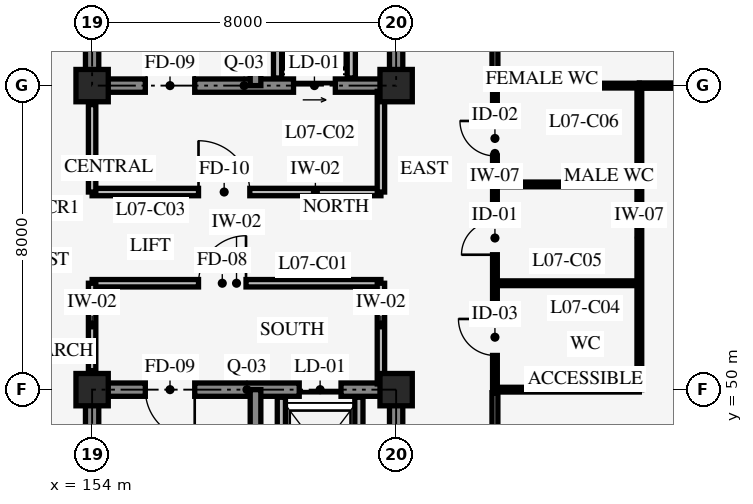
"""IFC4 building model, lengths in metres.
Left out: names, types, materials, properties, quantities, classifications, styles, units other than length and angle.
Written with IfcOpenShell. Run it as: python <this file> out.ifc"""

import sys

from ifc_helpers import new_model, si_unit, direction, frame, frame_2d, origin, origin_2d, place, context, subcontext, project, spatial, rectangle, extrude, element, fill, save


model = new_model("IFC4")
c1 = context("Model", 3, precision=1e-05, world=origin(), true_north=direction((0.0, 1.0)))
c2 = subcontext(c1, "Body", "Model", "MODEL_VIEW")
j1 = project(units=[si_unit("LENGTHUNIT", "METRE"), si_unit("PLANEANGLEUNIT", "RADIAN")], contexts=[c1])
p1 = place(None, origin())
s1 = spatial("IfcSite", under=j1, at=p1, CompositionType="ELEMENT")
p2 = place(p1, origin())
s2 = spatial("IfcBuilding", under=s1, at=p2, CompositionType="ELEMENT")
p3 = place(p2, frame((0.0, 0.0, 27.6)))
s3 = spatial("IfcBuildingStorey", under=s2, at=p3, CompositionType="ELEMENT", Elevation=27.6)
p4 = place(p3, frame((162.0, 42.0, 0.0), z_axis=(0.0, 0.0, 1.0), x_axis=(0.0, 1.0, 0.0)))
e1 = element("IfcWall", 1, at=p4, inside=s3, PredefinedType="SHEAR", context=c2, shape_type="SweptSolid", body=[
    extrude(rectangle(XDim=8.0, YDim=0.35, at=frame_2d((4.0, 0.0))), origin(), (0.0, 0.0, 1.0), 3.95),
])
p5 = place(p4, frame((3.175, 0.0, 0.0)))
e2 = element("IfcOpeningElement", 2, at=p5, cuts=e1, PredefinedType="OPENING", context=c2, shape_type="SweptSolid", body=[
    extrude(rectangle(XDim=1.05, YDim=2.2, at=frame_2d((0.525, 1.1))), frame((0.0, 0.185, 0.0), z_axis=(0.0, -1.0, 0.0), x_axis=(1.0, 0.0, 0.0)), (0.0, 0.0, 1.0), 0.37),
])
p6 = place(p3, frame((162.0, 50.0, 0.0), z_axis=(0.0, 0.0, 1.0), x_axis=(-1.0, 0.0, 0.0)))
e3 = element("IfcWall", 3, at=p6, inside=s3, PredefinedType="SHEAR", context=c2, shape_type="SweptSolid", body=[
    extrude(rectangle(XDim=8.0, YDim=0.35, at=frame_2d((4.0, 0.0))), origin(), (0.0, 0.0, 1.0), 3.95),
])
p7 = place(p6, frame((5.3, 0.0, 0.0)))
e4 = element("IfcOpeningElement", 4, at=p7, cuts=e3, PredefinedType="OPENING", context=c2, shape_type="SweptSolid", body=[
    extrude(rectangle(XDim=1.3, YDim=2.15, at=frame_2d((0.65, 1.075))), frame((0.0, 0.185, 0.0), z_axis=(0.0, -1.0, 0.0), x_axis=(1.0, 0.0, 0.0)), (0.0, 0.0, 1.0), 0.37),
])
p8 = place(p6, frame((1.45, 0.0, 0.0)))
e5 = element("IfcOpeningElement", 5, at=p8, cuts=e3, PredefinedType="OPENING", context=c2, shape_type="SweptSolid", body=[
    extrude(rectangle(XDim=1.1, YDim=2.2, at=frame_2d((0.55, 1.1))), frame((0.0, 0.185, 0.0), z_axis=(0.0, -1.0, 0.0), x_axis=(1.0, 0.0, 0.0)), (0.0, 0.0, 1.0), 0.37),
])
p9 = place(p3, frame((154.0, 50.0, 0.0), z_axis=(0.0, 0.0, 1.0), x_axis=(0.0, -1.0, 0.0)))
e6 = element("IfcWall", 6, at=p9, inside=s3, PredefinedType="SHEAR", context=c2, shape_type="SweptSolid", body=[
    extrude(rectangle(XDim=8.0, YDim=0.35, at=frame_2d((4.0, 0.0))), origin(), (0.0, 0.0, 1.0), 3.95),
])
p10 = place(p3, frame((158.3, 42.0, 0.0), z_axis=(0.0, 0.0, 1.0), x_axis=(0.0, 1.0, 0.0)))
e7 = element("IfcWall", 7, at=p10, inside=s3, PredefinedType="SHEAR", context=c2, shape_type="SweptSolid", body=[
    extrude(rectangle(XDim=8.0, YDim=0.28, at=frame_2d((4.0, 0.0))), origin(), (0.0, 0.0, 1.0), 3.95),
])
p11 = place(p3, frame((154.0, 58.0, 0.0), z_axis=(0.0, 0.0, 1.0), x_axis=(1.0, 0.0, 0.0)))
e8 = element("IfcWall", 8, at=p11, inside=s3, PredefinedType="SHEAR", context=c2, shape_type="SweptSolid", body=[
    extrude(rectangle(XDim=8.0, YDim=0.35, at=frame_2d((4.0, 0.0))), origin(), (0.0, 0.0, 1.0), 3.95),
])
p12 = place(p11, frame((1.4, 0.0, 0.0)))
e9 = element("IfcOpeningElement", 9, at=p12, cuts=e8, PredefinedType="OPENING", context=c2, shape_type="SweptSolid", body=[
    extrude(rectangle(XDim=1.3, YDim=2.15, at=frame_2d((0.65, 1.075))), frame((0.0, 0.185, 0.0), z_axis=(0.0, -1.0, 0.0), x_axis=(1.0, 0.0, 0.0)), (0.0, 0.0, 1.0), 0.37),
])
p13 = place(p11, frame((5.3, 0.0, 0.0)))
e10 = element("IfcOpeningElement", 10, at=p13, cuts=e8, PredefinedType="OPENING", context=c2, shape_type="SweptSolid", body=[
    extrude(rectangle(XDim=1.1, YDim=2.2, at=frame_2d((0.55, 1.1))), frame((0.0, 0.185, 0.0), z_axis=(0.0, -1.0, 0.0), x_axis=(1.0, 0.0, 0.0)), (0.0, 0.0, 1.0), 0.37),
])
p14 = place(p3, frame((162.0, 58.0, 0.0), z_axis=(0.0, 0.0, 1.0), x_axis=(0.0, 1.0, 0.0)))
e11 = element("IfcWall", 11, at=p14, inside=s3, PredefinedType="SHEAR", context=c2, shape_type="SweptSolid", body=[
    extrude(rectangle(XDim=8.0, YDim=0.35, at=frame_2d((4.0, 0.0))), origin(), (0.0, 0.0, 1.0), 3.95),
])
p15 = place(p14, frame((3.275, 0.0, 0.0)))
e12 = element("IfcOpeningElement", 12, at=p15, cuts=e11, PredefinedType="OPENING", context=c2, shape_type="SweptSolid", body=[
    extrude(rectangle(XDim=1.05, YDim=2.2, at=frame_2d((0.525, 1.1))), frame((0.0, 0.185, 0.0), z_axis=(0.0, -1.0, 0.0), x_axis=(1.0, 0.0, 0.0)), (0.0, 0.0, 1.0), 0.37),
])
p16 = place(p14, frame((5.45, 0.0, 0.0)))
e13 = element("IfcOpeningElement", 13, at=p16, cuts=e11, PredefinedType="OPENING", context=c2, shape_type="SweptSolid", body=[
    extrude(rectangle(XDim=1.4, YDim=2.3, at=frame_2d((0.7, 1.15))), frame((0.0, 0.185, 0.0), z_axis=(0.0, -1.0, 0.0), x_axis=(1.0, 0.0, 0.0)), (0.0, 0.0, 1.0), 0.37),
])
p17 = place(p3, frame((154.0, 66.0, 0.0), z_axis=(0.0, 0.0, 1.0), x_axis=(0.0, -1.0, 0.0)))
e14 = element("IfcWall", 14, at=p17, inside=s3, PredefinedType="SHEAR", context=c2, shape_type="SweptSolid", body=[
    extrude(rectangle(XDim=8.0, YDim=0.35, at=frame_2d((4.0, 0.0))), origin(), (0.0, 0.0, 1.0), 3.95),
])
p18 = place(p3, frame((158.3, 58.0, 0.0), z_axis=(0.0, 0.0, 1.0), x_axis=(0.0, 1.0, 0.0)))
e15 = element("IfcWall", 15, at=p18, inside=s3, PredefinedType="SHEAR", context=c2, shape_type="SweptSolid", body=[
    extrude(rectangle(XDim=8.0, YDim=0.28, at=frame_2d((4.0, 0.0))), origin(), (0.0, 0.0, 1.0), 3.95),
])
for number, where, z_axis, x_axis in (
    (16, (154.0, 50.0, 0.0), (0.0, 0.0, 1.0), (1.0, 0.0, 0.0)),
    (17, (154.0, 58.0, 0.0), (0.0, 0.0, 1.0), (1.0, 0.0, 0.0)),
    (18, (162.0, 50.0, 0.0), (0.0, 0.0, 1.0), (1.0, 0.0, 0.0)),
    (19, (162.0, 58.0, 0.0), (0.0, 0.0, 1.0), (1.0, 0.0, 0.0)),
):
    element("IfcColumn", number, at=place(p3, frame(where, z_axis=z_axis, x_axis=x_axis)), inside=s3, PredefinedType="COLUMN", context=c2, shape_type="SweptSolid", body=[
        extrude(rectangle(XDim=0.85, YDim=0.85, at=origin_2d()), origin(), (0.0, 0.0, 1.0), 4.2),
    ])
for number, where, z_axis, x_axis in (
    (20, (158.98, 47.02, 0.0), (0.0, 0.0, 1.0), (0.0, 1.0, 0.0)),
    (21, (161.02, 47.02, 0.0), (0.0, 0.0, 1.0), (0.0, 1.0, 0.0)),
):
    element("IfcWall", number, at=place(p3, frame(where, z_axis=z_axis, x_axis=x_axis)), inside=s3, PredefinedType="STANDARD", context=c2, shape_type="SweptSolid", body=[
        extrude(rectangle(XDim=2.78, YDim=0.215, at=frame_2d((1.39, 0.0))), origin(), (0.0, 0.0, 1.0), 3.9),
    ])
for number, where, z_axis, x_axis in (
    (22, (160.82, 58.2, 0.0), (0.0, 0.0, 1.0), (0.0, 1.0, 0.0)),
    (23, (158.88, 58.2, 0.0), (0.0, 0.0, 1.0), (0.0, 1.0, 0.0)),
):
    element("IfcWall", number, at=place(p3, frame(where, z_axis=z_axis, x_axis=x_axis)), inside=s3, PredefinedType="STANDARD", context=c2, shape_type="SweptSolid", body=[
        extrude(rectangle(XDim=2.55, YDim=0.215, at=frame_2d((1.275, 0.0))), origin(), (0.0, 0.0, 1.0), 3.9),
    ])
p19 = place(p3, frame((154.0, 52.8, 0.0), z_axis=(0.0, 0.0, 1.0), x_axis=(1.0, 0.0, 0.0)))
e24 = element("IfcWall", 24, at=p19, inside=s3, PredefinedType="STANDARD", context=c2, shape_type="SweptSolid", body=[
    extrude(rectangle(XDim=7.6, YDim=0.195, at=frame_2d((3.8, 0.0))), origin(), (0.0, 0.0, 1.0), 3.9),
])
p20 = place(p19, frame((2.8, 0.0, 0.0)))
e25 = element("IfcOpeningElement", 25, at=p20, cuts=e24, PredefinedType="OPENING", context=c2, shape_type="SweptSolid", body=[
    extrude(rectangle(XDim=1.25, YDim=2.15, at=frame_2d((0.625, 1.075))), frame((0.0, 0.107, 0.0), z_axis=(0.0, -1.0, 0.0), x_axis=(1.0, 0.0, 0.0)), (0.0, 0.0, 1.0), 0.215),
])
p21 = place(p3, frame((161.6, 50.15, 0.0), z_axis=(0.0, 0.0, 1.0), x_axis=(0.0, 1.0, 0.0)))
e26 = element("IfcWall", 26, at=p21, inside=s3, PredefinedType="STANDARD", context=c2, shape_type="SweptSolid", body=[
    extrude(rectangle(XDim=2.65, YDim=0.195, at=frame_2d((1.325, 0.0))), origin(), (0.0, 0.0, 1.0), 3.29),
])
p22 = place(p3, frame((154.0, 50.5, 0.0), z_axis=(0.0, 0.0, 1.0), x_axis=(0.0, 1.0, 0.0)))
e27 = element("IfcWall", 27, at=p22, inside=s3, PredefinedType="STANDARD", context=c2, shape_type="SweptSolid", body=[
    extrude(rectangle(XDim=2.3, YDim=0.195, at=frame_2d((1.15, 0.0))), origin(), (0.0, 0.0, 1.0), 3.29),
])
p23 = place(p3, frame((154.0, 55.2, 0.0), z_axis=(0.0, 0.0, 1.0), x_axis=(1.0, 0.0, 0.0)))
e28 = element("IfcWall", 28, at=p23, inside=s3, PredefinedType="STANDARD", context=c2, shape_type="SweptSolid", body=[
    extrude(rectangle(XDim=7.6, YDim=0.195, at=frame_2d((3.8, 0.0))), origin(), (0.0, 0.0, 1.0), 3.9),
])
p24 = place(p23, frame((2.8, 0.0, 0.0)))
e29 = element("IfcOpeningElement", 29, at=p24, cuts=e28, PredefinedType="OPENING", context=c2, shape_type="SweptSolid", body=[
    extrude(rectangle(XDim=1.35, YDim=2.15, at=frame_2d((0.675, 1.075))), frame((0.0, 0.107, 0.0), z_axis=(0.0, -1.0, 0.0), x_axis=(1.0, 0.0, 0.0)), (0.0, 0.0, 1.0), 0.215),
])
p25 = place(p3, frame((161.6, 55.2, 0.0), z_axis=(0.0, 0.0, 1.0), x_axis=(0.0, 1.0, 0.0)))
e30 = element("IfcWall", 30, at=p25, inside=s3, PredefinedType="STANDARD", context=c2, shape_type="SweptSolid", body=[
    extrude(rectangle(XDim=2.65, YDim=0.195, at=frame_2d((1.325, 0.0))), origin(), (0.0, 0.0, 1.0), 3.29),
])
p26 = place(p3, frame((154.0, 55.2, 0.0), z_axis=(0.0, 0.0, 1.0), x_axis=(0.0, 1.0, 0.0)))
e31 = element("IfcWall", 31, at=p26, inside=s3, PredefinedType="STANDARD", context=c2, shape_type="SweptSolid", body=[
    extrude(rectangle(XDim=2.3, YDim=0.195, at=frame_2d((1.15, 0.0))), origin(), (0.0, 0.0, 1.0), 3.29),
])
p27 = place(p3, frame((164.6, 50.0, 0.0), z_axis=(0.0, 0.0, 1.0), x_axis=(0.0, 1.0, 0.0)))
e32 = element("IfcWall", 32, at=p27, inside=s3, PredefinedType="STANDARD", context=c2, shape_type="SweptSolid", body=[
    extrude(rectangle(XDim=8.0, YDim=0.125, at=frame_2d((4.0, 0.0))), origin(), (0.0, 0.0, 1.0), 3.9),
])
p28 = place(p27, frame((0.9, 0.0, 0.0)))
e33 = element("IfcOpeningElement", 33, at=p28, cuts=e32, PredefinedType="OPENING", context=c2, shape_type="SweptSolid", body=[
    extrude(rectangle(XDim=0.96, YDim=2.08, at=frame_2d((0.48, 1.04))), frame((0.0, 0.073, 0.0), z_axis=(0.0, -1.0, 0.0), x_axis=(1.0, 0.0, 0.0)), (0.0, 0.0, 1.0), 0.145),
])
p29 = place(p27, frame((3.55, 0.0, 0.0)))
e34 = element("IfcOpeningElement", 34, at=p29, cuts=e32, PredefinedType="OPENING", context=c2, shape_type="SweptSolid", body=[
    extrude(rectangle(XDim=0.88, YDim=2.05, at=frame_2d((0.44, 1.025))), frame((0.0, 0.073, 0.0), z_axis=(0.0, -1.0, 0.0), x_axis=(1.0, 0.0, 0.0)), (0.0, 0.0, 1.0), 0.145),
])
p30 = place(p27, frame((6.15, 0.0, 0.0)))
e35 = element("IfcOpeningElement", 35, at=p30, cuts=e32, PredefinedType="OPENING", context=c2, shape_type="SweptSolid", body=[
    extrude(rectangle(XDim=0.92, YDim=2.05, at=frame_2d((0.46, 1.025))), frame((0.0, 0.073, 0.0), z_axis=(0.0, -1.0, 0.0), x_axis=(1.0, 0.0, 0.0)), (0.0, 0.0, 1.0), 0.145),
])
p31 = place(p3, frame((168.4, 50.0, 0.0), z_axis=(0.0, 0.0, 1.0), x_axis=(0.0, 1.0, 0.0)))
e36 = element("IfcWall", 36, at=p31, inside=s3, PredefinedType="STANDARD", context=c2, shape_type="SweptSolid", body=[
    extrude(rectangle(XDim=8.0, YDim=0.125, at=frame_2d((4.0, 0.0))), origin(), (0.0, 0.0, 1.0), 3.9),
])
p32 = place(p3, frame((164.6, 50.0, 0.0), z_axis=(0.0, 0.0, 1.0), x_axis=(1.0, 0.0, 0.0)))
e37 = element("IfcWall", 37, at=p32, inside=s3, PredefinedType="STANDARD", context=c2, shape_type="SweptSolid", body=[
    extrude(rectangle(XDim=3.8, YDim=0.125, at=frame_2d((1.9, 0.0))), origin(), (0.0, 0.0, 1.0), 3.24),
])
for number, where, z_axis, x_axis in (
    (38, (164.6, 52.8, 0.0), (0.0, 0.0, 1.0), (1.0, 0.0, 0.0)),
    (39, (164.6, 55.4, 0.0), (0.0, 0.0, 1.0), (1.0, 0.0, 0.0)),
):
    element("IfcWall", number, at=place(p3, frame(where, z_axis=z_axis, x_axis=x_axis)), inside=s3, PredefinedType="STANDARD", context=c2, shape_type="SweptSolid", body=[
        extrude(rectangle(XDim=3.8, YDim=0.125, at=frame_2d((1.9, 0.0))), origin(), (0.0, 0.0, 1.0), 3.9),
    ])
p33 = place(p3, frame((164.6, 58.0, 0.0), z_axis=(0.0, 0.0, 1.0), x_axis=(1.0, 0.0, 0.0)))
e40 = element("IfcWall", 40, at=p33, inside=s3, PredefinedType="STANDARD", context=c2, shape_type="SweptSolid", body=[
    extrude(rectangle(XDim=3.8, YDim=0.125, at=frame_2d((1.9, 0.0))), origin(), (0.0, 0.0, 1.0), 3.24),
])
p34 = place(p3, frame((164.6, 42.12, 0.0), z_axis=(0.0, 0.0, 1.0), x_axis=(0.0, 1.0, 0.0)))
e41 = element("IfcWall", 41, at=p34, inside=s3, PredefinedType="STANDARD", context=c2, shape_type="SweptSolid", body=[
    extrude(rectangle(XDim=7.8, YDim=0.155, at=frame_2d((3.9, 0.0))), origin(), (0.0, 0.0, 1.0), 3.9),
])
p35 = place(p34, frame((3.05, 0.0, 0.0)))
e42 = element("IfcOpeningElement", 42, at=p35, cuts=e41, PredefinedType="OPENING", context=c2, shape_type="SweptSolid", body=[
    extrude(rectangle(XDim=1.7, YDim=2.3, at=frame_2d((0.85, 1.15))), frame((0.0, 0.087, 0.0), z_axis=(0.0, -1.0, 0.0), x_axis=(1.0, 0.0, 0.0)), (0.0, 0.0, 1.0), 0.175),
])
p36 = place(p3, frame((168.4, 58.0, 0.0), z_axis=(0.0, 0.0, 1.0), x_axis=(1.0, 0.0, 0.0)))
e43 = element("IfcWall", 43, at=p36, inside=s3, PredefinedType="STANDARD", context=c2, shape_type="SweptSolid", body=[
    extrude(rectangle(XDim=8.96, YDim=0.14, at=frame_2d((4.48, 0.0))), origin(), (0.0, 0.0, 1.0), 3.24),
])
p37 = place(p36, frame((3.79, 0.0, 0.0)))
e44 = element("IfcOpeningElement", 44, at=p37, cuts=e43, PredefinedType="OPENING", context=c2, shape_type="SweptSolid", body=[
    extrude(rectangle(XDim=1.38, YDim=2.16, at=frame_2d((0.69, 1.08))), frame((0.0, 0.08, 0.0), z_axis=(0.0, -1.0, 0.0), x_axis=(1.0, 0.0, 0.0)), (0.0, 0.0, 1.0), 0.16),
])
p38 = place(p3, frame((164.6, 58.08, 0.0), z_axis=(0.0, 0.0, 1.0), x_axis=(0.0, 1.0, 0.0)))
e45 = element("IfcWall", 45, at=p38, inside=s3, PredefinedType="STANDARD", context=c2, shape_type="SweptSolid", body=[
    extrude(rectangle(XDim=7.8, YDim=0.155, at=frame_2d((3.9, 0.0))), origin(), (0.0, 0.0, 1.0), 3.9),
])
p39 = place(p38, frame((3.0, 0.0, 0.0)))
e46 = element("IfcOpeningElement", 46, at=p39, cuts=e45, PredefinedType="OPENING", context=c2, shape_type="SweptSolid", body=[
    extrude(rectangle(XDim=1.8, YDim=2.3, at=frame_2d((0.9, 1.15))), frame((0.0, 0.087, 0.0), z_axis=(0.0, -1.0, 0.0), x_axis=(1.0, 0.0, 0.0)), (0.0, 0.0, 1.0), 0.175),
])
p40 = place(p7, origin())
e47 = element("IfcDoor", 47, at=p40, inside=s3, OperationType="SINGLE_SWING_LEFT", PredefinedType="DOOR", context=c2, shape_type="SweptSolid", body=[
    extrude(rectangle(XDim=1.3, YDim=2.15, at=frame_2d((0.65, 1.075))), frame((0.0, 0.025, 0.0), z_axis=(0.0, -1.0, 0.0), x_axis=(1.0, 0.0, 0.0)), (0.0, 0.0, 1.0), 0.05),
])
fill(e4, e47)
p41 = place(p8, origin())
e48 = element("IfcDoor", 48, at=p41, inside=s3, OperationType="SLIDING_TO_LEFT", PredefinedType="DOOR", context=c2, shape_type="SweptSolid", body=[
    extrude(rectangle(XDim=1.1, YDim=2.2, at=frame_2d((0.55, 1.1))), frame((0.0, 0.025, 0.0), z_axis=(0.0, -1.0, 0.0), x_axis=(1.0, 0.0, 0.0)), (0.0, 0.0, 1.0), 0.05),
])
fill(e5, e48)
p42 = place(p12, origin())
e49 = element("IfcDoor", 49, at=p42, inside=s3, OperationType="SINGLE_SWING_RIGHT", PredefinedType="DOOR", context=c2, shape_type="SweptSolid", body=[
    extrude(rectangle(XDim=1.3, YDim=2.15, at=frame_2d((0.65, 1.075))), frame((0.0, 0.025, 0.0), z_axis=(0.0, -1.0, 0.0), x_axis=(1.0, 0.0, 0.0)), (0.0, 0.0, 1.0), 0.05),
])
fill(e9, e49)
p43 = place(p13, origin())
e50 = element("IfcDoor", 50, at=p43, inside=s3, OperationType="SLIDING_TO_RIGHT", PredefinedType="DOOR", context=c2, shape_type="SweptSolid", body=[
    extrude(rectangle(XDim=1.1, YDim=2.2, at=frame_2d((0.55, 1.1))), frame((0.0, 0.025, 0.0), z_axis=(0.0, -1.0, 0.0), x_axis=(1.0, 0.0, 0.0)), (0.0, 0.0, 1.0), 0.05),
])
fill(e10, e50)
p44 = place(p20, origin())
e51 = element("IfcDoor", 51, at=p44, inside=s3, OperationType="SINGLE_SWING_RIGHT", PredefinedType="DOOR", context=c2, shape_type="SweptSolid", body=[
    extrude(rectangle(XDim=1.25, YDim=2.15, at=frame_2d((0.625, 1.075))), frame((0.0, 0.025, 0.0), z_axis=(0.0, -1.0, 0.0), x_axis=(1.0, 0.0, 0.0)), (0.0, 0.0, 1.0), 0.05),
])
fill(e25, e51)
p45 = place(p24, origin())
e52 = element("IfcDoor", 52, at=p45, inside=s3, OperationType="SINGLE_SWING_LEFT", PredefinedType="DOOR", context=c2, shape_type="SweptSolid", body=[
    extrude(rectangle(XDim=1.35, YDim=2.15, at=frame_2d((0.675, 1.075))), frame((0.0, 0.025, 0.0), z_axis=(0.0, -1.0, 0.0), x_axis=(1.0, 0.0, 0.0)), (0.0, 0.0, 1.0), 0.05),
])
fill(e29, e52)
p46 = place(p28, origin())
e53 = element("IfcDoor", 53, at=p46, inside=s3, OperationType="SINGLE_SWING_RIGHT", PredefinedType="DOOR", context=c2, shape_type="SweptSolid", body=[
    extrude(rectangle(XDim=0.96, YDim=2.08, at=frame_2d((0.48, 1.04))), frame((0.0, 0.025, 0.0), z_axis=(0.0, -1.0, 0.0), x_axis=(1.0, 0.0, 0.0)), (0.0, 0.0, 1.0), 0.05),
])
fill(e33, e53)
p47 = place(p29, origin())
e54 = element("IfcDoor", 54, at=p47, inside=s3, OperationType="SINGLE_SWING_LEFT", PredefinedType="DOOR", context=c2, shape_type="SweptSolid", body=[
    extrude(rectangle(XDim=0.88, YDim=2.05, at=frame_2d((0.44, 1.025))), frame((0.0, 0.025, 0.0), z_axis=(0.0, -1.0, 0.0), x_axis=(1.0, 0.0, 0.0)), (0.0, 0.0, 1.0), 0.05),
])
fill(e34, e54)
p48 = place(p30, origin())
e55 = element("IfcDoor", 55, at=p48, inside=s3, OperationType="SINGLE_SWING_RIGHT", PredefinedType="DOOR", context=c2, shape_type="SweptSolid", body=[
    extrude(rectangle(XDim=0.92, YDim=2.05, at=frame_2d((0.46, 1.025))), frame((0.0, 0.025, 0.0), z_axis=(0.0, -1.0, 0.0), x_axis=(1.0, 0.0, 0.0)), (0.0, 0.0, 1.0), 0.05),
])
fill(e35, e55)
save(model, sys.argv[1])
